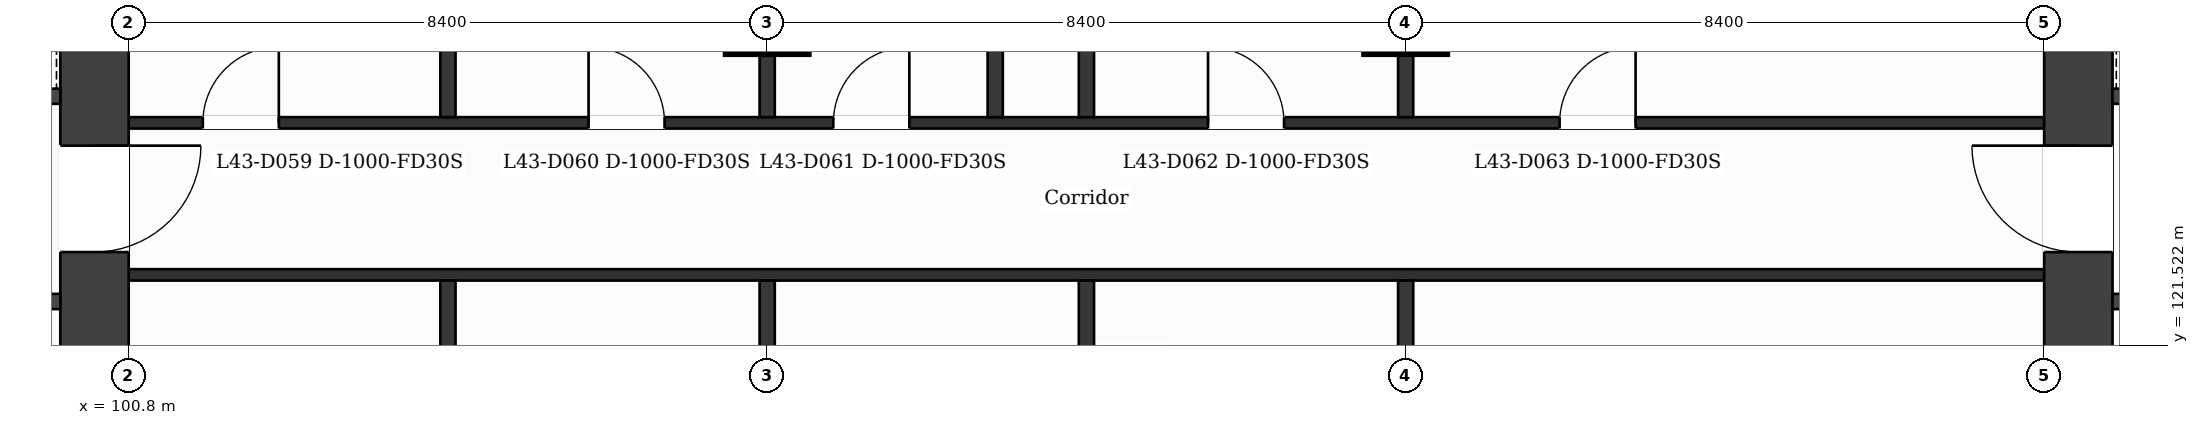
"""IFC4 building model, lengths in metres.
Left out: names, types, materials, properties, quantities, classifications, styles, units other than length and angle.
Written with IfcOpenShell. Run it as: python <this file> out.ifc"""

import sys

from ifc_helpers import new_model, si_unit, direction, frame, frame_2d, origin, origin_2d, place, context, subcontext, project, spatial, rectangle, extrude, element, fill, save


model = new_model("IFC4")
c1 = context("Model", 3, precision=1e-05, world=origin(), true_north=direction((0.0, 1.0)))
c2 = subcontext(c1, "Body", "Model", "MODEL_VIEW")
j1 = project(units=[si_unit("LENGTHUNIT", "METRE"), si_unit("PLANEANGLEUNIT", "RADIAN")], contexts=[c1])
p1 = place(None, origin())
s1 = spatial("IfcSite", under=j1, at=p1, CompositionType="ELEMENT")
p2 = place(p1, origin())
s2 = spatial("IfcBuilding", under=s1, at=p2, CompositionType="ELEMENT")
p3 = place(p2, frame((0.0, 0.0, 181.1)))
s3 = spatial("IfcBuildingStorey", under=s2, at=p3, CompositionType="ELEMENT", Elevation=181.1)
p4 = place(p3, frame((100.35, 131.95, 0.0), z_axis=(0.0, 0.0, 1.0), x_axis=(0.0, -1.0, 0.0)))
e1 = element("IfcWall", 1, at=p4, inside=s3, PredefinedType="SHEAR", context=c2, shape_type="SweptSolid", body=[
    extrude(rectangle(XDim=21.1, YDim=0.9, at=frame_2d((10.55, 0.0))), origin(), (0.0, 0.0, 1.0), 3.7),
])
p5 = place(p4, frame((7.8, 0.0, 0.0)))
e2 = element("IfcOpeningElement", 2, at=p5, cuts=e1, PredefinedType="OPENING", context=c2, shape_type="SweptSolid", body=[
    extrude(rectangle(XDim=1.4, YDim=2.1, at=frame_2d((0.7, 1.05))), frame((0.0, 0.46, 0.0), z_axis=(0.0, -1.0, 0.0), x_axis=(1.0, 0.0, 0.0)), (0.0, 0.0, 1.0), 0.92),
])
p6 = place(p3, frame((126.45, 110.85, 0.0), z_axis=(0.0, 0.0, 1.0), x_axis=(0.0, 1.0, 0.0)))
e3 = element("IfcWall", 3, at=p6, inside=s3, PredefinedType="SHEAR", context=c2, shape_type="SweptSolid", body=[
    extrude(rectangle(XDim=21.1, YDim=0.9, at=frame_2d((10.55, 0.0))), origin(), (0.0, 0.0, 1.0), 3.7),
])
p7 = place(p6, frame((11.9, 0.0, 0.0)))
e4 = element("IfcOpeningElement", 4, at=p7, cuts=e3, PredefinedType="OPENING", context=c2, shape_type="SweptSolid", body=[
    extrude(rectangle(XDim=1.4, YDim=2.1, at=frame_2d((0.7, 1.05))), frame((0.0, 0.46, 0.0), z_axis=(0.0, -1.0, 0.0), x_axis=(1.0, 0.0, 0.0)), (0.0, 0.0, 1.0), 0.92),
])
for number, where, z_axis, x_axis in (
    (5, (109.2, 125.9, 0.0), (0.0, 0.0, 1.0), (1.0, 0.0, 0.0)),
    (6, (117.6, 125.9, 0.0), (0.0, 0.0, 1.0), (1.0, 0.0, 0.0)),
):
    element("IfcColumn", number, at=place(p3, frame(where, z_axis=z_axis, x_axis=x_axis)), inside=s3, PredefinedType="COLUMN", context=c2, shape_type="SweptSolid", body=[
        extrude(rectangle(XDim=1.1, YDim=1.1, at=origin_2d()), origin(), (0.0, 0.0, 1.0), 3.7),
    ])
p8 = place(p3, frame((95.227, 122.1, 0.0), z_axis=(0.0, 0.0, 1.0), x_axis=(1.0, 0.0, 0.0)))
e7 = element("IfcWall", 7, at=p8, inside=s3, PredefinedType="PARTITIONING", context=c2, shape_type="SweptSolid", body=[
    extrude(rectangle(XDim=4.673, YDim=0.2, at=frame_2d((2.336, 0.0))), origin(), (0.0, 0.0, 1.0), 3.38),
])
p9 = place(p8, frame((0.902, 0.0, 0.0)))
e8 = element("IfcOpeningElement", 8, at=p9, cuts=e7, PredefinedType="OPENING", context=c2, shape_type="SweptSolid", body=[
    extrude(rectangle(XDim=0.9, YDim=2.1, at=frame_2d((0.45, 1.05))), frame((0.0, 0.11, 0.0), z_axis=(0.0, -1.0, 0.0), x_axis=(1.0, 0.0, 0.0)), (0.0, 0.0, 1.0), 0.22),
])
p10 = place(p8, frame((3.128, 0.0, 0.0)))
e9 = element("IfcOpeningElement", 9, at=p10, cuts=e7, PredefinedType="OPENING", context=c2, shape_type="SweptSolid", body=[
    extrude(rectangle(XDim=0.9, YDim=2.1, at=frame_2d((0.45, 1.05))), frame((0.0, 0.11, 0.0), z_axis=(0.0, -1.0, 0.0), x_axis=(1.0, 0.0, 0.0)), (0.0, 0.0, 1.0), 0.22),
])
p11 = place(p3, frame((126.9, 122.1, 0.0), z_axis=(0.0, 0.0, 1.0), x_axis=(1.0, 0.0, 0.0)))
e10 = element("IfcWall", 10, at=p11, inside=s3, PredefinedType="PARTITIONING", context=c2, shape_type="SweptSolid", body=[
    extrude(rectangle(XDim=4.673, YDim=0.2, at=frame_2d((2.336, 0.0))), origin(), (0.0, 0.0, 1.0), 3.38),
])
p12 = place(p11, frame((2.981, 0.0, 0.0)))
e11 = element("IfcOpeningElement", 11, at=p12, cuts=e10, PredefinedType="OPENING", context=c2, shape_type="SweptSolid", body=[
    extrude(rectangle(XDim=0.9, YDim=2.1, at=frame_2d((0.45, 1.05))), frame((0.0, 0.11, 0.0), z_axis=(0.0, -1.0, 0.0), x_axis=(1.0, 0.0, 0.0)), (0.0, 0.0, 1.0), 0.22),
])
p13 = place(p11, frame((0.645, 0.0, 0.0)))
e12 = element("IfcOpeningElement", 12, at=p13, cuts=e10, PredefinedType="OPENING", context=c2, shape_type="SweptSolid", body=[
    extrude(rectangle(XDim=0.9, YDim=2.1, at=frame_2d((0.45, 1.05))), frame((0.0, 0.11, 0.0), z_axis=(0.0, -1.0, 0.0), x_axis=(1.0, 0.0, 0.0)), (0.0, 0.0, 1.0), 0.22),
])
p14 = place(p3, frame((100.8, 122.45, 0.0), z_axis=(0.0, 0.0, 1.0), x_axis=(1.0, 0.0, 0.0)))
e13 = element("IfcWall", 13, at=p14, inside=s3, PredefinedType="PARTITIONING", context=c2, shape_type="SweptSolid", body=[
    extrude(rectangle(XDim=25.2, YDim=0.15, at=frame_2d((12.6, 0.0))), origin(), (0.0, 0.0, 1.0), 3.38),
])
p15 = place(p3, frame((100.8, 124.45, 0.0), z_axis=(0.0, 0.0, 1.0), x_axis=(1.0, 0.0, 0.0)))
e14 = element("IfcWall", 14, at=p15, inside=s3, PredefinedType="PARTITIONING", context=c2, shape_type="SweptSolid", body=[
    extrude(rectangle(XDim=25.2, YDim=0.15, at=frame_2d((12.6, 0.0))), origin(), (0.0, 0.0, 1.0), 3.38),
])
p16 = place(p15, frame((0.975, 0.0, 0.0)))
e15 = element("IfcOpeningElement", 15, at=p16, cuts=e14, PredefinedType="OPENING", context=c2, shape_type="SweptSolid", body=[
    extrude(rectangle(XDim=1.0, YDim=2.1, at=frame_2d((0.5, 1.05))), frame((0.0, 0.085, 0.0), z_axis=(0.0, -1.0, 0.0), x_axis=(1.0, 0.0, 0.0)), (0.0, 0.0, 1.0), 0.17),
])
p17 = place(p15, frame((6.05, 0.0, 0.0)))
e16 = element("IfcOpeningElement", 16, at=p17, cuts=e14, PredefinedType="OPENING", context=c2, shape_type="SweptSolid", body=[
    extrude(rectangle(XDim=1.0, YDim=2.1, at=frame_2d((0.5, 1.05))), frame((0.0, 0.085, 0.0), z_axis=(0.0, -1.0, 0.0), x_axis=(1.0, 0.0, 0.0)), (0.0, 0.0, 1.0), 0.17),
])
p18 = place(p15, frame((9.27, 0.0, 0.0)))
e17 = element("IfcOpeningElement", 17, at=p18, cuts=e14, PredefinedType="OPENING", context=c2, shape_type="SweptSolid", body=[
    extrude(rectangle(XDim=1.0, YDim=2.1, at=frame_2d((0.5, 1.05))), frame((0.0, 0.085, 0.0), z_axis=(0.0, -1.0, 0.0), x_axis=(1.0, 0.0, 0.0)), (0.0, 0.0, 1.0), 0.17),
])
p19 = place(p15, frame((14.2, 0.0, 0.0)))
e18 = element("IfcOpeningElement", 18, at=p19, cuts=e14, PredefinedType="OPENING", context=c2, shape_type="SweptSolid", body=[
    extrude(rectangle(XDim=1.0, YDim=2.1, at=frame_2d((0.5, 1.05))), frame((0.0, 0.085, 0.0), z_axis=(0.0, -1.0, 0.0), x_axis=(1.0, 0.0, 0.0)), (0.0, 0.0, 1.0), 0.17),
])
p20 = place(p15, frame((18.825, 0.0, 0.0)))
e19 = element("IfcOpeningElement", 19, at=p20, cuts=e14, PredefinedType="OPENING", context=c2, shape_type="SweptSolid", body=[
    extrude(rectangle(XDim=1.0, YDim=2.1, at=frame_2d((0.5, 1.05))), frame((0.0, 0.085, 0.0), z_axis=(0.0, -1.0, 0.0), x_axis=(1.0, 0.0, 0.0)), (0.0, 0.0, 1.0), 0.17),
])
p21 = place(p3, frame((92.702, 124.8, 0.0), z_axis=(0.0, 0.0, 1.0), x_axis=(1.0, 0.0, 0.0)))
e20 = element("IfcWall", 20, at=p21, inside=s3, PredefinedType="PARTITIONING", context=c2, shape_type="SweptSolid", body=[
    extrude(rectangle(XDim=7.198, YDim=0.2, at=frame_2d((3.599, 0.0))), origin(), (0.0, 0.0, 1.0), 3.38),
])
p22 = place(p21, frame((5.469, 0.0, 0.0)))
e21 = element("IfcOpeningElement", 21, at=p22, cuts=e20, PredefinedType="OPENING", context=c2, shape_type="SweptSolid", body=[
    extrude(rectangle(XDim=1.1, YDim=2.1, at=frame_2d((0.55, 1.05))), frame((0.0, 0.11, 0.0), z_axis=(0.0, -1.0, 0.0), x_axis=(1.0, 0.0, 0.0)), (0.0, 0.0, 1.0), 0.22),
])
p23 = place(p3, frame((126.9, 124.8, 0.0), z_axis=(0.0, 0.0, 1.0), x_axis=(1.0, 0.0, 0.0)))
e22 = element("IfcWall", 22, at=p23, inside=s3, PredefinedType="PARTITIONING", context=c2, shape_type="SweptSolid", body=[
    extrude(rectangle(XDim=4.715, YDim=0.2, at=frame_2d((2.358, 0.0))), origin(), (0.0, 0.0, 1.0), 3.38),
])
p24 = place(p23, frame((0.685, 0.0, 0.0)))
e23 = element("IfcOpeningElement", 23, at=p24, cuts=e22, PredefinedType="OPENING", context=c2, shape_type="SweptSolid", body=[
    extrude(rectangle(XDim=1.1, YDim=2.1, at=frame_2d((0.55, 1.05))), frame((0.0, 0.11, 0.0), z_axis=(0.0, -1.0, 0.0), x_axis=(1.0, 0.0, 0.0)), (0.0, 0.0, 1.0), 0.22),
])
p25 = place(p3, frame((105.0, 109.075, 0.0), z_axis=(0.0, 0.0, 1.0), x_axis=(0.0, 1.0, 0.0)))
e24 = element("IfcWall", 24, at=p25, inside=s3, PredefinedType="PARTITIONING", context=c2, shape_type="SweptSolid", body=[
    extrude(rectangle(XDim=13.3, YDim=0.2, at=frame_2d((6.65, 0.0))), origin(), (0.0, 0.0, 1.0), 3.38),
])
p26 = place(p3, frame((105.0, 124.525, 0.0), z_axis=(0.0, 0.0, 1.0), x_axis=(0.0, 1.0, 0.0)))
e25 = element("IfcWall", 25, at=p26, inside=s3, PredefinedType="PARTITIONING", context=c2, shape_type="SweptSolid", body=[
    extrude(rectangle(XDim=9.2, YDim=0.2, at=frame_2d((4.6, 0.0))), origin(), (0.0, 0.0, 1.0), 3.38),
])
p27 = place(p3, frame((109.2, 109.075, 0.0), z_axis=(0.0, 0.0, 1.0), x_axis=(0.0, 1.0, 0.0)))
e26 = element("IfcWall", 26, at=p27, inside=s3, PredefinedType="PARTITIONING", context=c2, shape_type="SweptSolid", body=[
    extrude(rectangle(XDim=13.3, YDim=0.2, at=frame_2d((6.65, 0.0))), origin(), (0.0, 0.0, 1.0), 3.38),
])
p28 = place(p3, frame((109.2, 124.525, 0.0), z_axis=(0.0, 0.0, 1.0), x_axis=(0.0, 1.0, 0.0)))
e27 = element("IfcWall", 27, at=p28, inside=s3, PredefinedType="PARTITIONING", context=c2, shape_type="SweptSolid", body=[
    extrude(rectangle(XDim=9.2, YDim=0.2, at=frame_2d((4.6, 0.0))), origin(), (0.0, 0.0, 1.0), 3.38),
])
p29 = place(p3, frame((112.2, 124.525, 0.0), z_axis=(0.0, 0.0, 1.0), x_axis=(0.0, 1.0, 0.0)))
e28 = element("IfcWall", 28, at=p29, inside=s3, PredefinedType="PARTITIONING", context=c2, shape_type="SweptSolid", body=[
    extrude(rectangle(XDim=5.825, YDim=0.2, at=frame_2d((2.913, 0.0))), origin(), (0.0, 0.0, 1.0), 3.38),
])
p30 = place(p3, frame((113.4, 109.075, 0.0), z_axis=(0.0, 0.0, 1.0), x_axis=(0.0, 1.0, 0.0)))
e29 = element("IfcWall", 29, at=p30, inside=s3, PredefinedType="PARTITIONING", context=c2, shape_type="SweptSolid", body=[
    extrude(rectangle(XDim=13.3, YDim=0.2, at=frame_2d((6.65, 0.0))), origin(), (0.0, 0.0, 1.0), 3.38),
])
p31 = place(p3, frame((113.4, 124.525, 0.0), z_axis=(0.0, 0.0, 1.0), x_axis=(0.0, 1.0, 0.0)))
e30 = element("IfcWall", 30, at=p31, inside=s3, PredefinedType="PARTITIONING", context=c2, shape_type="SweptSolid", body=[
    extrude(rectangle(XDim=9.2, YDim=0.2, at=frame_2d((4.6, 0.0))), origin(), (0.0, 0.0, 1.0), 3.38),
])
p32 = place(p3, frame((117.6, 109.075, 0.0), z_axis=(0.0, 0.0, 1.0), x_axis=(0.0, 1.0, 0.0)))
e31 = element("IfcWall", 31, at=p32, inside=s3, PredefinedType="PARTITIONING", context=c2, shape_type="SweptSolid", body=[
    extrude(rectangle(XDim=13.3, YDim=0.2, at=frame_2d((6.65, 0.0))), origin(), (0.0, 0.0, 1.0), 3.38),
])
p33 = place(p3, frame((117.6, 124.525, 0.0), z_axis=(0.0, 0.0, 1.0), x_axis=(0.0, 1.0, 0.0)))
e32 = element("IfcWall", 32, at=p33, inside=s3, PredefinedType="PARTITIONING", context=c2, shape_type="SweptSolid", body=[
    extrude(rectangle(XDim=9.2, YDim=0.2, at=frame_2d((4.6, 0.0))), origin(), (0.0, 0.0, 1.0), 3.38),
])
p34 = place(p16, origin())
e33 = element("IfcDoor", 33, at=p34, inside=s3, OperationType="SINGLE_SWING_RIGHT", PredefinedType="DOOR", context=c2, shape_type="SweptSolid", body=[
    extrude(rectangle(XDim=1.0, YDim=2.1, at=frame_2d((0.5, 1.05))), frame((0.0, 0.025, 0.0), z_axis=(0.0, -1.0, 0.0), x_axis=(1.0, 0.0, 0.0)), (0.0, 0.0, 1.0), 0.05),
])
fill(e15, e33)
p35 = place(p17, origin())
e34 = element("IfcDoor", 34, at=p35, inside=s3, OperationType="SINGLE_SWING_LEFT", PredefinedType="DOOR", context=c2, shape_type="SweptSolid", body=[
    extrude(rectangle(XDim=1.0, YDim=2.1, at=frame_2d((0.5, 1.05))), frame((0.0, 0.025, 0.0), z_axis=(0.0, -1.0, 0.0), x_axis=(1.0, 0.0, 0.0)), (0.0, 0.0, 1.0), 0.05),
])
fill(e16, e34)
p36 = place(p18, origin())
e35 = element("IfcDoor", 35, at=p36, inside=s3, OperationType="SINGLE_SWING_RIGHT", PredefinedType="DOOR", context=c2, shape_type="SweptSolid", body=[
    extrude(rectangle(XDim=1.0, YDim=2.1, at=frame_2d((0.5, 1.05))), frame((0.0, 0.025, 0.0), z_axis=(0.0, -1.0, 0.0), x_axis=(1.0, 0.0, 0.0)), (0.0, 0.0, 1.0), 0.05),
])
fill(e17, e35)
p37 = place(p19, origin())
e36 = element("IfcDoor", 36, at=p37, inside=s3, OperationType="SINGLE_SWING_LEFT", PredefinedType="DOOR", context=c2, shape_type="SweptSolid", body=[
    extrude(rectangle(XDim=1.0, YDim=2.1, at=frame_2d((0.5, 1.05))), frame((0.0, 0.025, 0.0), z_axis=(0.0, -1.0, 0.0), x_axis=(1.0, 0.0, 0.0)), (0.0, 0.0, 1.0), 0.05),
])
fill(e18, e36)
p38 = place(p20, origin())
e37 = element("IfcDoor", 37, at=p38, inside=s3, OperationType="SINGLE_SWING_RIGHT", PredefinedType="DOOR", context=c2, shape_type="SweptSolid", body=[
    extrude(rectangle(XDim=1.0, YDim=2.1, at=frame_2d((0.5, 1.05))), frame((0.0, 0.025, 0.0), z_axis=(0.0, -1.0, 0.0), x_axis=(1.0, 0.0, 0.0)), (0.0, 0.0, 1.0), 0.05),
])
fill(e19, e37)
p39 = place(p5, origin())
e38 = element("IfcDoor", 38, at=p39, inside=s3, OperationType="SINGLE_SWING_LEFT", PredefinedType="DOOR", context=c2, shape_type="SweptSolid", body=[
    extrude(rectangle(XDim=1.4, YDim=2.1, at=frame_2d((0.7, 1.05))), frame((0.0, 0.025, 0.0), z_axis=(0.0, -1.0, 0.0), x_axis=(1.0, 0.0, 0.0)), (0.0, 0.0, 1.0), 0.05),
])
fill(e2, e38)
p40 = place(p7, origin())
e39 = element("IfcDoor", 39, at=p40, inside=s3, OperationType="SINGLE_SWING_RIGHT", PredefinedType="DOOR", context=c2, shape_type="SweptSolid", body=[
    extrude(rectangle(XDim=1.4, YDim=2.1, at=frame_2d((0.7, 1.05))), frame((0.0, 0.025, 0.0), z_axis=(0.0, -1.0, 0.0), x_axis=(1.0, 0.0, 0.0)), (0.0, 0.0, 1.0), 0.05),
])
fill(e4, e39)
save(model, sys.argv[1])
